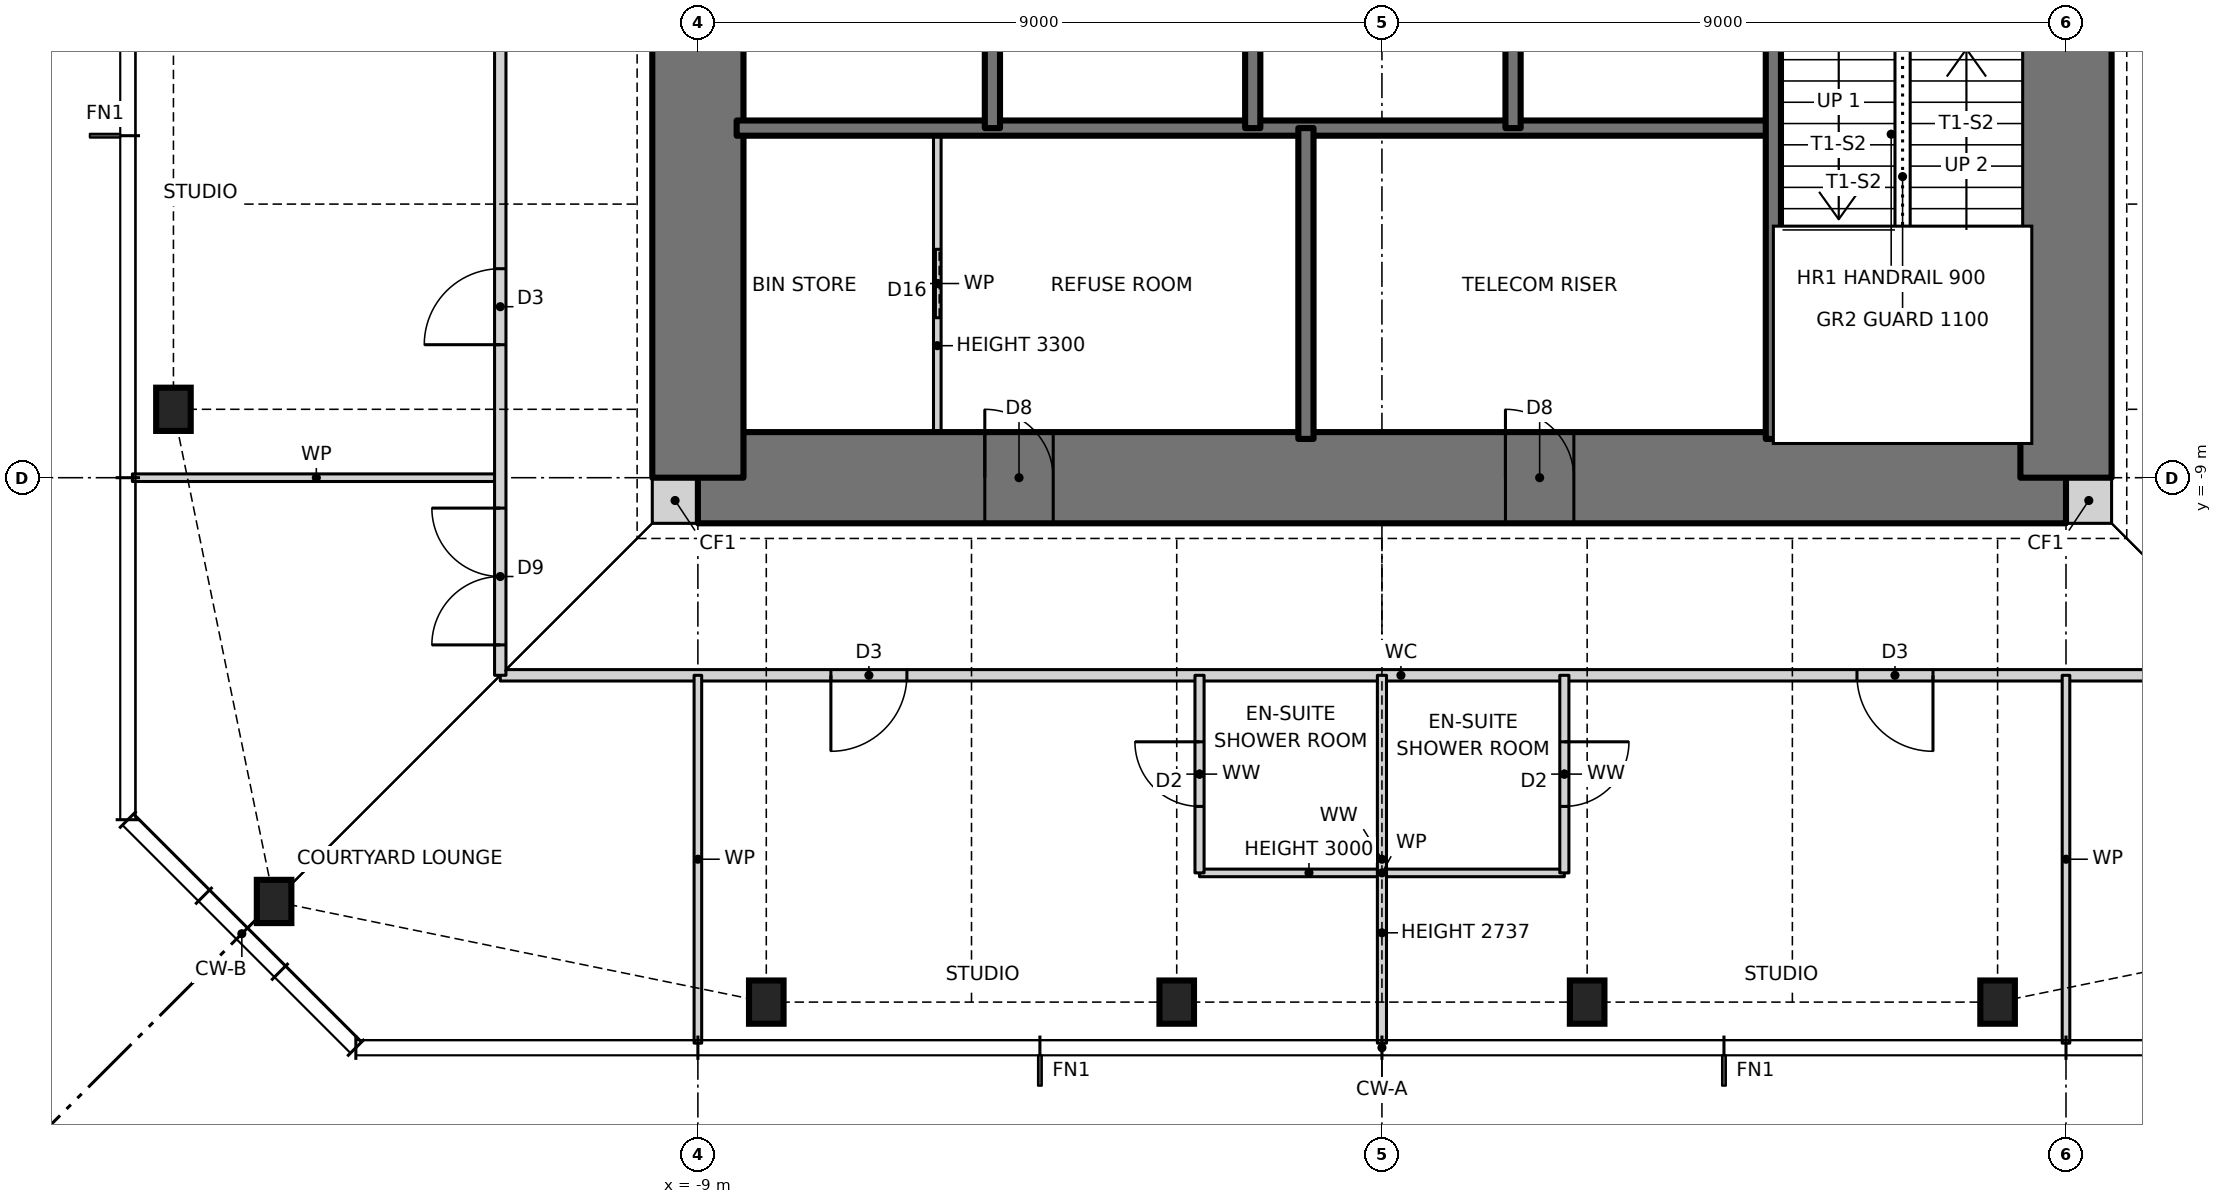
"""IFC4 building model, lengths in metres.
Left out: names, types, materials, properties, quantities, classifications, styles, units other than length and angle.
Written with IfcOpenShell. Run it as: python <this file> out.ifc"""

import sys

from ifc_helpers import new_model, si_unit, direction, frame, frame_2d, origin, origin_2d, place, context, subcontext, project, spatial, rectangle, i_section, extrude, element, fill, save


model = new_model("IFC4")
c1 = context("Model", 3, precision=1e-05, world=origin(), true_north=direction((0.0, 1.0)))
c2 = subcontext(c1, "Body", "Model", "MODEL_VIEW")
j1 = project(units=[si_unit("LENGTHUNIT", "METRE"), si_unit("PLANEANGLEUNIT", "RADIAN")], contexts=[c1])
p1 = place(None, origin())
s1 = spatial("IfcSite", under=j1, at=p1, CompositionType="ELEMENT")
p2 = place(p1, origin())
s2 = spatial("IfcBuilding", under=s1, at=p2, CompositionType="ELEMENT")
p3 = place(p2, frame((0.0, 0.0, 253.5)))
s3 = spatial("IfcBuildingStorey", under=s2, at=p3, CompositionType="ELEMENT", Elevation=253.5)
for number, where, z_axis, x_axis in (
    (1, (-14.576, -14.576, 0.0), (0.0, 0.0, 1.0), (1.0, 0.0, 0.0)),
    (2, (-8.1, -15.9, 0.0), (0.0, 0.0, 1.0), (1.0, 0.0, 0.0)),
    (3, (-2.7, -15.9, 0.0), (0.0, 0.0, 1.0), (1.0, 0.0, 0.0)),
    (4, (2.7, -15.9, 0.0), (0.0, 0.0, 1.0), (1.0, 0.0, 0.0)),
    (5, (8.1, -15.9, 0.0), (0.0, 0.0, 1.0), (1.0, 0.0, 0.0)),
    (6, (-15.9, -8.1, 0.0), (0.0, 0.0, 1.0), (1.0, 0.0, 0.0)),
):
    element("IfcColumn", number, at=place(p3, frame(where, z_axis=z_axis, x_axis=x_axis)), inside=s3, PredefinedType="COLUMN", context=c2, shape_type="SweptSolid", body=[
        extrude(i_section(OverallWidth=0.455, OverallDepth=0.569, WebThickness=0.078, FlangeThickness=0.125, at=origin_2d()), origin(), (0.0, 0.0, 1.0), 3.5),
    ])
for number, where, z_axis, x_axis in (
    (7, (-9.6, -9.3, 0.0), (0.0, 0.0, 1.0), (1.0, 0.0, 0.0)),
    (8, (9.0, -9.3, 0.0), (0.0, 0.0, 1.0), (1.0, 0.0, 0.0)),
):
    element("IfcWall", number, at=place(p3, frame(where, z_axis=z_axis, x_axis=x_axis)), inside=s3, PredefinedType="SOLIDWALL", context=c2, shape_type="SweptSolid", body=[
        extrude(rectangle(XDim=0.6, YDim=0.6, at=frame_2d((0.3, 0.0))), origin(), (0.0, 0.0, 1.0), 3.5),
    ])
p4 = place(p3, frame((-9.0, -9.0, 0.0), z_axis=(0.0, 0.0, 1.0), x_axis=(1.0, 0.0, 0.0)))
e9 = element("IfcWall", 9, at=p4, inside=s3, PredefinedType="SHEAR", context=c2, shape_type="SweptSolid", body=[
    extrude(rectangle(XDim=18.0, YDim=1.2, at=frame_2d((9.0, 0.0))), origin(), (0.0, 0.0, 1.0), 3.5),
])
p5 = place(p4, frame((3.775, 0.0, 0.0)))
e10 = element("IfcOpeningElement", 10, at=p5, cuts=e9, PredefinedType="OPENING", context=c2, shape_type="SweptSolid", body=[
    extrude(rectangle(XDim=0.9, YDim=2.1, at=frame_2d((0.45, 1.05))), frame((0.0, 0.61, 0.0), z_axis=(0.0, -1.0, 0.0), x_axis=(1.0, 0.0, 0.0)), (0.0, 0.0, 1.0), 1.22),
])
p6 = place(p4, frame((10.625, 0.0, 0.0)))
e11 = element("IfcOpeningElement", 11, at=p6, cuts=e9, PredefinedType="OPENING", context=c2, shape_type="SweptSolid", body=[
    extrude(rectangle(XDim=0.9, YDim=2.1, at=frame_2d((0.45, 1.05))), frame((0.0, 0.61, 0.0), z_axis=(0.0, -1.0, 0.0), x_axis=(1.0, 0.0, 0.0)), (0.0, 0.0, 1.0), 1.22),
])
p7 = place(p3, frame((9.0, -9.0, 0.0), z_axis=(0.0, 0.0, 1.0), x_axis=(0.0, 1.0, 0.0)))
e12 = element("IfcWall", 12, at=p7, inside=s3, PredefinedType="SHEAR", context=c2, shape_type="SweptSolid", body=[
    extrude(rectangle(XDim=18.0, YDim=1.2, at=frame_2d((9.0, 0.0))), origin(), (0.0, 0.0, 1.0), 3.5),
])
p8 = place(p7, frame((8.5, 0.0, 0.0)))
e13 = element("IfcOpeningElement", 13, at=p8, cuts=e12, PredefinedType="OPENING", context=c2, shape_type="SweptSolid", body=[
    extrude(rectangle(XDim=1.0, YDim=2.1, at=frame_2d((0.5, 1.05))), frame((0.0, 0.61, 0.0), z_axis=(0.0, -1.0, 0.0), x_axis=(1.0, 0.0, 0.0)), (0.0, 0.0, 1.0), 1.22),
])
p9 = place(p3, frame((-9.0, 9.0, 0.0), z_axis=(0.0, 0.0, 1.0), x_axis=(0.0, -1.0, 0.0)))
e14 = element("IfcWall", 14, at=p9, inside=s3, PredefinedType="SHEAR", context=c2, shape_type="SweptSolid", body=[
    extrude(rectangle(XDim=18.0, YDim=1.2, at=frame_2d((9.0, 0.0))), origin(), (0.0, 0.0, 1.0), 3.5),
])
p10 = place(p9, frame((8.5, 0.0, 0.0)))
e15 = element("IfcOpeningElement", 15, at=p10, cuts=e14, PredefinedType="OPENING", context=c2, shape_type="SweptSolid", body=[
    extrude(rectangle(XDim=1.0, YDim=2.1, at=frame_2d((0.5, 1.05))), frame((0.0, 0.61, 0.0), z_axis=(0.0, -1.0, 0.0), x_axis=(1.0, 0.0, 0.0)), (0.0, 0.0, 1.0), 1.22),
])
p11 = place(p3, frame((-2.4, -14.2, 0.0), z_axis=(0.0, 0.0, 1.0), x_axis=(1.0, 0.0, 0.0)))
e16 = element("IfcWall", 16, at=p11, inside=s3, PredefinedType="PARTITIONING", context=c2, shape_type="SweptSolid", body=[
    extrude(rectangle(XDim=4.8, YDim=0.1, at=frame_2d((2.4, 0.0))), origin(), (0.0, 0.0, 1.0), 3.0),
])
p12 = place(p3, frame((-11.6, -11.6, 0.0), z_axis=(0.0, 0.0, 1.0), x_axis=(1.0, 0.0, 0.0)))
e17 = element("IfcWall", 17, at=p12, inside=s3, PredefinedType="PARTITIONING", context=c2, shape_type="SweptSolid", body=[
    extrude(rectangle(XDim=23.7, YDim=0.15, at=frame_2d((11.85, 0.0))), origin(), (0.0, 0.0, 1.0), 3.27),
])
p13 = place(p12, frame((4.35, 0.0, 0.0)))
e18 = element("IfcOpeningElement", 18, at=p13, cuts=e17, PredefinedType="OPENING", context=c2, shape_type="SweptSolid", body=[
    extrude(rectangle(XDim=1.0, YDim=2.1, at=frame_2d((0.5, 1.05))), frame((0.0, 0.085, 0.0), z_axis=(0.0, -1.0, 0.0), x_axis=(1.0, 0.0, 0.0)), (0.0, 0.0, 1.0), 0.17),
])
p14 = place(p12, frame((17.85, 0.0, 0.0)))
e19 = element("IfcOpeningElement", 19, at=p14, cuts=e17, PredefinedType="OPENING", context=c2, shape_type="SweptSolid", body=[
    extrude(rectangle(XDim=1.0, YDim=2.1, at=frame_2d((0.5, 1.05))), frame((0.0, 0.085, 0.0), z_axis=(0.0, -1.0, 0.0), x_axis=(1.0, 0.0, 0.0)), (0.0, 0.0, 1.0), 0.17),
])
p15 = place(p12, frame((21.725, 0.0, 0.0)))
e20 = element("IfcOpeningElement", 20, at=p15, cuts=e17, PredefinedType="OPENING", context=c2, shape_type="SweptSolid", body=[
    extrude(rectangle(XDim=0.85, YDim=2.1, at=frame_2d((0.425, 1.05))), frame((0.0, 0.085, 0.0), z_axis=(0.0, -1.0, 0.0), x_axis=(1.0, 0.0, 0.0)), (0.0, 0.0, 1.0), 0.17),
])
p16 = place(p3, frame((-16.44, -9.0, 0.0), z_axis=(0.0, 0.0, 1.0), x_axis=(1.0, 0.0, 0.0)))
e21 = element("IfcWall", 21, at=p16, inside=s3, PredefinedType="PARTITIONING", context=c2, shape_type="SweptSolid", body=[
    extrude(rectangle(XDim=4.84, YDim=0.1, at=frame_2d((2.42, 0.0))), origin(), (0.0, 0.0, 1.0), 3.27),
])
p17 = place(p3, frame((-8.49, -4.4, 0.0), z_axis=(0.0, 0.0, 1.0), x_axis=(1.0, 0.0, 0.0)))
e22 = element("IfcWall", 22, at=p17, inside=s3, PredefinedType="SOLIDWALL", context=c2, shape_type="SweptSolid", body=[
    extrude(rectangle(XDim=13.64, YDim=0.2, at=frame_2d((6.82, 0.0))), origin(), (0.0, 0.0, 1.0), 3.5),
])
p18 = place(p3, frame((9.0, -16.44, 0.0), z_axis=(0.0, 0.0, 1.0), x_axis=(0.0, 1.0, 0.0)))
e23 = element("IfcWall", 23, at=p18, inside=s3, PredefinedType="PARTITIONING", context=c2, shape_type="SweptSolid", body=[
    extrude(rectangle(XDim=4.84, YDim=0.1, at=frame_2d((2.42, 0.0))), origin(), (0.0, 0.0, 1.0), 3.27),
])
p19 = place(p3, frame((5.15, -8.49, 0.0), z_axis=(0.0, 0.0, 1.0), x_axis=(0.0, 1.0, 0.0)))
e24 = element("IfcWall", 24, at=p19, inside=s3, PredefinedType="SOLIDWALL", context=c2, shape_type="SweptSolid", body=[
    extrude(rectangle(XDim=13.09, YDim=0.2, at=frame_2d((6.545, 0.0))), origin(), (0.0, 0.0, 1.0), 3.5),
])
p20 = place(p19, frame((7.89, 0.0, 0.0)))
e25 = element("IfcOpeningElement", 25, at=p20, cuts=e24, PredefinedType="OPENING", context=c2, shape_type="SweptSolid", body=[
    extrude(rectangle(XDim=1.2, YDim=2.1, at=frame_2d((0.6, 1.05))), frame((0.0, 0.11, 0.0), z_axis=(0.0, -1.0, 0.0), x_axis=(1.0, 0.0, 0.0)), (0.0, 0.0, 1.0), 0.22),
])
p21 = place(p3, frame((2.4, -14.2, 0.0), z_axis=(0.0, 0.0, 1.0), x_axis=(0.0, 1.0, 0.0)))
e26 = element("IfcWall", 26, at=p21, inside=s3, PredefinedType="PARTITIONING", context=c2, shape_type="SweptSolid", body=[
    extrude(rectangle(XDim=2.6, YDim=0.12, at=frame_2d((1.3, 0.0))), origin(), (0.0, 0.0, 1.0), 3.27),
])
p22 = place(p21, frame((0.875, 0.0, 0.0)))
e27 = element("IfcOpeningElement", 27, at=p22, cuts=e26, PredefinedType="OPENING", context=c2, shape_type="SweptSolid", body=[
    extrude(rectangle(XDim=0.85, YDim=2.1, at=frame_2d((0.425, 1.05))), frame((0.0, 0.07, 0.0), z_axis=(0.0, -1.0, 0.0), x_axis=(1.0, 0.0, 0.0)), (0.0, 0.0, 1.0), 0.14),
])
p23 = place(p3, frame((1.725, -4.4, 0.0), z_axis=(0.0, 0.0, 1.0), x_axis=(0.0, 1.0, 0.0)))
e28 = element("IfcWall", 28, at=p23, inside=s3, PredefinedType="SOLIDWALL", context=c2, shape_type="SweptSolid", body=[
    extrude(rectangle(XDim=2.8, YDim=0.2, at=frame_2d((1.4, 0.0))), origin(), (0.0, 0.0, 1.0), 3.5),
])
p24 = place(p3, frame((0.0, -16.44, 0.0), z_axis=(0.0, 0.0, 1.0), x_axis=(0.0, 1.0, 0.0)))
e29 = element("IfcWall", 29, at=p24, inside=s3, PredefinedType="PARTITIONING", context=c2, shape_type="SweptSolid", body=[
    extrude(rectangle(XDim=4.84, YDim=0.12, at=frame_2d((2.42, 0.0))), origin(), (0.0, 0.0, 1.0), 2.737),
])
p25 = place(p3, frame((-1.0, -8.49, 0.0), z_axis=(0.0, 0.0, 1.0), x_axis=(0.0, 1.0, 0.0)))
e30 = element("IfcWall", 30, at=p25, inside=s3, PredefinedType="SOLIDWALL", context=c2, shape_type="SweptSolid", body=[
    extrude(rectangle(XDim=4.09, YDim=0.2, at=frame_2d((2.045, 0.0))), origin(), (0.0, 0.0, 1.0), 3.5),
])
p26 = place(p3, frame((-1.7, -4.4, 0.0), z_axis=(0.0, 0.0, 1.0), x_axis=(0.0, 1.0, 0.0)))
e31 = element("IfcWall", 31, at=p26, inside=s3, PredefinedType="SOLIDWALL", context=c2, shape_type="SweptSolid", body=[
    extrude(rectangle(XDim=2.8, YDim=0.2, at=frame_2d((1.4, 0.0))), origin(), (0.0, 0.0, 1.0), 3.5),
])
p27 = place(p3, frame((-2.4, -14.2, 0.0), z_axis=(0.0, 0.0, 1.0), x_axis=(0.0, 1.0, 0.0)))
e32 = element("IfcWall", 32, at=p27, inside=s3, PredefinedType="PARTITIONING", context=c2, shape_type="SweptSolid", body=[
    extrude(rectangle(XDim=2.6, YDim=0.12, at=frame_2d((1.3, 0.0))), origin(), (0.0, 0.0, 1.0), 3.27),
])
p28 = place(p27, frame((0.875, 0.0, 0.0)))
e33 = element("IfcOpeningElement", 33, at=p28, cuts=e32, PredefinedType="OPENING", context=c2, shape_type="SweptSolid", body=[
    extrude(rectangle(XDim=0.85, YDim=2.1, at=frame_2d((0.425, 1.05))), frame((0.0, 0.07, 0.0), z_axis=(0.0, -1.0, 0.0), x_axis=(1.0, 0.0, 0.0)), (0.0, 0.0, 1.0), 0.14),
])
p29 = place(p3, frame((-5.125, -4.4, 0.0), z_axis=(0.0, 0.0, 1.0), x_axis=(0.0, 1.0, 0.0)))
e34 = element("IfcWall", 34, at=p29, inside=s3, PredefinedType="SOLIDWALL", context=c2, shape_type="SweptSolid", body=[
    extrude(rectangle(XDim=2.8, YDim=0.2, at=frame_2d((1.4, 0.0))), origin(), (0.0, 0.0, 1.0), 3.5),
])
p30 = place(p3, frame((-5.85, -8.49, 0.0), z_axis=(0.0, 0.0, 1.0), x_axis=(0.0, 1.0, 0.0)))
e35 = element("IfcWall", 35, at=p30, inside=s3, PredefinedType="PARTITIONING", context=c2, shape_type="SweptSolid", body=[
    extrude(rectangle(XDim=4.09, YDim=0.1, at=frame_2d((2.045, 0.0))), origin(), (0.0, 0.0, 1.0), 3.3),
])
p31 = place(p30, frame((1.595, 0.0, 0.0)))
e36 = element("IfcOpeningElement", 36, at=p31, cuts=e35, PredefinedType="OPENING", context=c2, shape_type="SweptSolid", body=[
    extrude(rectangle(XDim=0.9, YDim=2.1, at=frame_2d((0.45, 1.05))), frame((0.0, 0.06, 0.0), z_axis=(0.0, -1.0, 0.0), x_axis=(1.0, 0.0, 0.0)), (0.0, 0.0, 1.0), 0.12),
])
p32 = place(p3, frame((-9.0, -16.44, 0.0), z_axis=(0.0, 0.0, 1.0), x_axis=(0.0, 1.0, 0.0)))
e37 = element("IfcWall", 37, at=p32, inside=s3, PredefinedType="PARTITIONING", context=c2, shape_type="SweptSolid", body=[
    extrude(rectangle(XDim=4.84, YDim=0.1, at=frame_2d((2.42, 0.0))), origin(), (0.0, 0.0, 1.0), 3.27),
])
p33 = place(p3, frame((-11.6, -11.6, 0.0), z_axis=(0.0, 0.0, 1.0), x_axis=(0.0, 1.0, 0.0)))
e38 = element("IfcWall", 38, at=p33, inside=s3, PredefinedType="PARTITIONING", context=c2, shape_type="SweptSolid", body=[
    extrude(rectangle(XDim=23.2, YDim=0.15, at=frame_2d((11.6, 0.0))), origin(), (0.0, 0.0, 1.0), 3.27),
])
p34 = place(p33, frame((17.85, 0.0, 0.0)))
e39 = element("IfcOpeningElement", 39, at=p34, cuts=e38, PredefinedType="OPENING", context=c2, shape_type="SweptSolid", body=[
    extrude(rectangle(XDim=1.0, YDim=2.1, at=frame_2d((0.5, 1.05))), frame((0.0, 0.085, 0.0), z_axis=(0.0, -1.0, 0.0), x_axis=(1.0, 0.0, 0.0)), (0.0, 0.0, 1.0), 0.17),
])
p35 = place(p33, frame((4.35, 0.0, 0.0)))
e40 = element("IfcOpeningElement", 40, at=p35, cuts=e38, PredefinedType="OPENING", context=c2, shape_type="SweptSolid", body=[
    extrude(rectangle(XDim=1.0, YDim=2.1, at=frame_2d((0.5, 1.05))), frame((0.0, 0.085, 0.0), z_axis=(0.0, -1.0, 0.0), x_axis=(1.0, 0.0, 0.0)), (0.0, 0.0, 1.0), 0.17),
])
p36 = place(p33, frame((0.4, 0.0, 0.0)))
e41 = element("IfcOpeningElement", 41, at=p36, cuts=e38, PredefinedType="OPENING", context=c2, shape_type="SweptSolid", body=[
    extrude(rectangle(XDim=1.8, YDim=2.1, at=frame_2d((0.9, 1.05))), frame((0.0, 0.085, 0.0), z_axis=(0.0, -1.0, 0.0), x_axis=(1.0, 0.0, 0.0)), (0.0, 0.0, 1.0), 0.17),
])
p37 = place(p31, origin())
e42 = element("IfcDoor", 42, at=p37, inside=s3, OperationType="SLIDING_TO_LEFT", PredefinedType="DOOR", context=c2, shape_type="SweptSolid", body=[
    extrude(rectangle(XDim=0.9, YDim=2.1, at=frame_2d((0.45, 1.05))), frame((0.0, 0.025, 0.0), z_axis=(0.0, -1.0, 0.0), x_axis=(1.0, 0.0, 0.0)), (0.0, 0.0, 1.0), 0.05),
])
fill(e36, e42)
p38 = place(p13, frame((1.0, 0.0, 0.0), z_axis=(0.0, 0.0, 1.0), x_axis=(-1.0, 0.0, 0.0)))
e43 = element("IfcDoor", 43, at=p38, inside=s3, OperationType="SINGLE_SWING_RIGHT", PredefinedType="DOOR", context=c2, shape_type="SweptSolid", body=[
    extrude(rectangle(XDim=1.0, YDim=2.1, at=frame_2d((0.5, 1.05))), frame((0.0, 0.025, 0.0), z_axis=(0.0, -1.0, 0.0), x_axis=(1.0, 0.0, 0.0)), (0.0, 0.0, 1.0), 0.05),
])
fill(e18, e43)
p39 = place(p28, origin())
e44 = element("IfcDoor", 44, at=p39, inside=s3, OperationType="SINGLE_SWING_RIGHT", PredefinedType="DOOR", context=c2, shape_type="SweptSolid", body=[
    extrude(rectangle(XDim=0.85, YDim=2.1, at=frame_2d((0.425, 1.05))), frame((0.0, 0.025, 0.0), z_axis=(0.0, -1.0, 0.0), x_axis=(1.0, 0.0, 0.0)), (0.0, 0.0, 1.0), 0.05),
])
fill(e33, e44)
p40 = place(p14, frame((1.0, 0.0, 0.0), z_axis=(0.0, 0.0, 1.0), x_axis=(-1.0, 0.0, 0.0)))
e45 = element("IfcDoor", 45, at=p40, inside=s3, OperationType="SINGLE_SWING_LEFT", PredefinedType="DOOR", context=c2, shape_type="SweptSolid", body=[
    extrude(rectangle(XDim=1.0, YDim=2.1, at=frame_2d((0.5, 1.05))), frame((0.0, 0.025, 0.0), z_axis=(0.0, -1.0, 0.0), x_axis=(1.0, 0.0, 0.0)), (0.0, 0.0, 1.0), 0.05),
])
fill(e19, e45)
p41 = place(p22, frame((0.85, 0.0, 0.0), z_axis=(0.0, 0.0, 1.0), x_axis=(-1.0, 0.0, 0.0)))
e46 = element("IfcDoor", 46, at=p41, inside=s3, OperationType="SINGLE_SWING_LEFT", PredefinedType="DOOR", context=c2, shape_type="SweptSolid", body=[
    extrude(rectangle(XDim=0.85, YDim=2.1, at=frame_2d((0.425, 1.05))), frame((0.0, 0.025, 0.0), z_axis=(0.0, -1.0, 0.0), x_axis=(1.0, 0.0, 0.0)), (0.0, 0.0, 1.0), 0.05),
])
fill(e27, e46)
p42 = place(p35, origin())
e47 = element("IfcDoor", 47, at=p42, inside=s3, OperationType="SINGLE_SWING_LEFT", PredefinedType="DOOR", context=c2, shape_type="SweptSolid", body=[
    extrude(rectangle(XDim=1.0, YDim=2.1, at=frame_2d((0.5, 1.05))), frame((0.0, 0.025, 0.0), z_axis=(0.0, -1.0, 0.0), x_axis=(1.0, 0.0, 0.0)), (0.0, 0.0, 1.0), 0.05),
])
fill(e40, e47)
p43 = place(p36, origin())
e48 = element("IfcDoor", 48, at=p43, inside=s3, OperationType="DOUBLE_DOOR_SINGLE_SWING", PredefinedType="DOOR", context=c2, shape_type="SweptSolid", body=[
    extrude(rectangle(XDim=1.8, YDim=2.1, at=frame_2d((0.9, 1.05))), frame((0.0, 0.025, 0.0), z_axis=(0.0, -1.0, 0.0), x_axis=(1.0, 0.0, 0.0)), (0.0, 0.0, 1.0), 0.05),
])
fill(e41, e48)
p44 = place(p5, origin())
e49 = element("IfcDoor", 49, at=p44, inside=s3, OperationType="SINGLE_SWING_LEFT", PredefinedType="DOOR", context=c2, shape_type="SweptSolid", body=[
    extrude(rectangle(XDim=0.9, YDim=2.1, at=frame_2d((0.45, 1.05))), frame((0.0, 0.025, 0.0), z_axis=(0.0, -1.0, 0.0), x_axis=(1.0, 0.0, 0.0)), (0.0, 0.0, 1.0), 0.05),
])
fill(e10, e49)
p45 = place(p6, origin())
e50 = element("IfcDoor", 50, at=p45, inside=s3, OperationType="SINGLE_SWING_LEFT", PredefinedType="DOOR", context=c2, shape_type="SweptSolid", body=[
    extrude(rectangle(XDim=0.9, YDim=2.1, at=frame_2d((0.45, 1.05))), frame((0.0, 0.025, 0.0), z_axis=(0.0, -1.0, 0.0), x_axis=(1.0, 0.0, 0.0)), (0.0, 0.0, 1.0), 0.05),
])
fill(e11, e50)
save(model, sys.argv[1])
